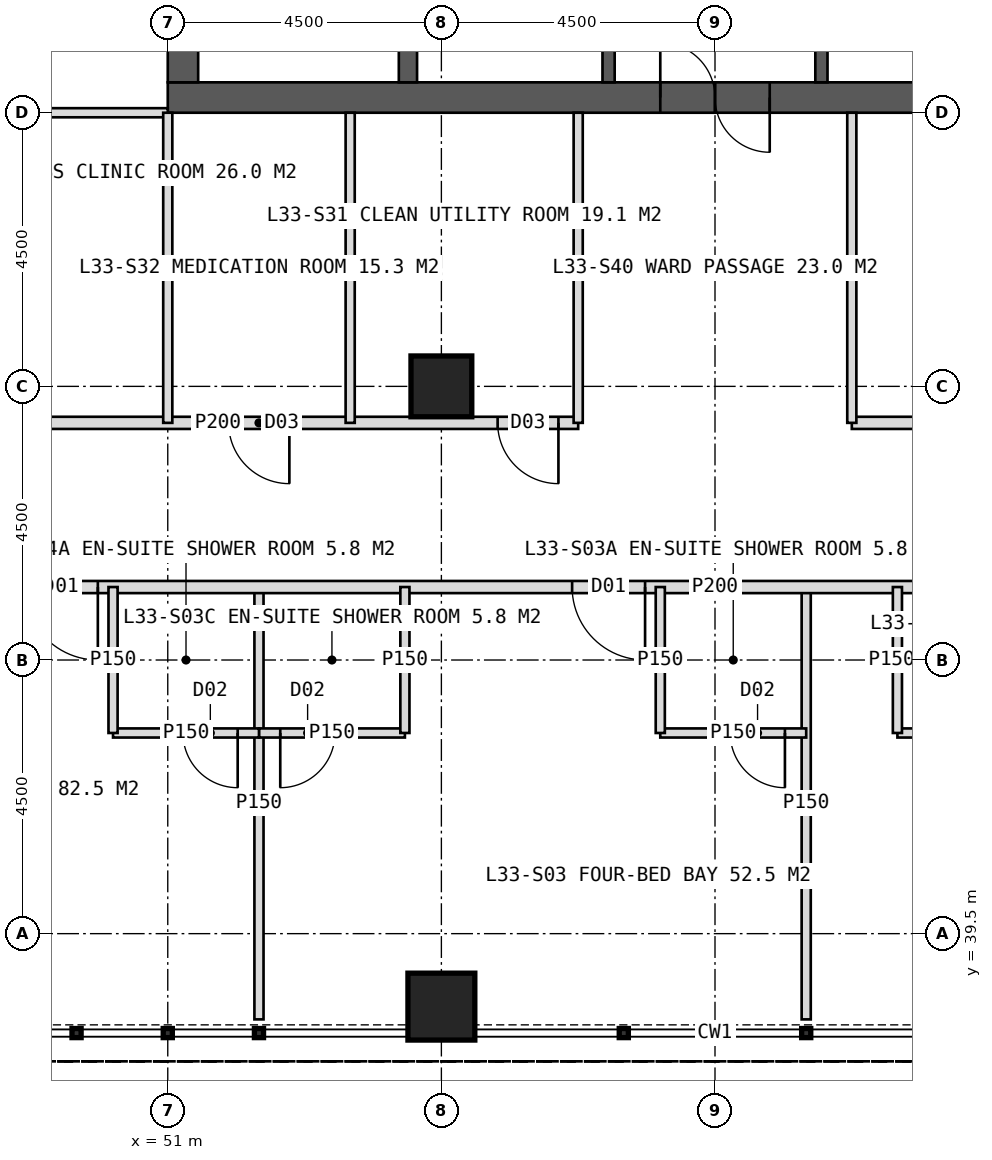
"""IFC4 building model, lengths in metres.
Left out: names, types, materials, properties, quantities, classifications, styles, units other than length and angle.
Written with IfcOpenShell. Run it as: python <this file> out.ifc"""

import sys

from ifc_helpers import new_model, si_unit, direction, frame, frame_2d, origin, origin_2d, place, context, subcontext, project, spatial, rectangle, hollow_rectangle, extrude, element, fill, save


model = new_model("IFC4")
c1 = context("Model", 3, precision=1e-05, world=origin(), true_north=direction((0.0, 1.0)))
c2 = subcontext(c1, "Body", "Model", "MODEL_VIEW")
j1 = project(units=[si_unit("LENGTHUNIT", "METRE"), si_unit("PLANEANGLEUNIT", "RADIAN")], contexts=[c1])
p1 = place(None, origin())
s1 = spatial("IfcSite", under=j1, at=p1, CompositionType="ELEMENT")
p2 = place(p1, origin())
s2 = spatial("IfcBuilding", under=s1, at=p2, CompositionType="ELEMENT")
p3 = place(p2, frame((0.0, 0.0, 140.0)))
s3 = spatial("IfcBuildingStorey", under=s2, at=p3, CompositionType="ELEMENT", Elevation=140.0)
p4 = place(p3, frame((51.0, 53.25, 0.0), z_axis=(0.0, 0.0, 1.0), x_axis=(1.0, 0.0, 0.0)))
e1 = element("IfcWall", 1, at=p4, inside=s3, PredefinedType="SHEAR", context=c2, shape_type="SweptSolid", body=[
    extrude(rectangle(XDim=18.0, YDim=0.5, at=frame_2d((9.0, 0.0))), origin(), (0.0, 0.0, 1.0), 4.0),
])
p5 = place(p4, frame((8.1, 0.0, 0.0)))
e2 = element("IfcOpeningElement", 2, at=p5, cuts=e1, PredefinedType="OPENING", context=c2, shape_type="SweptSolid", body=[
    extrude(rectangle(XDim=1.8, YDim=2.2, at=frame_2d((0.9, 1.1))), frame((0.0, 0.26, 0.0), z_axis=(0.0, -1.0, 0.0), x_axis=(1.0, 0.0, 0.0)), (0.0, 0.0, 1.0), 0.52),
])
p6 = place(p3, frame((51.25, 53.5, 0.0), z_axis=(0.0, 0.0, 1.0), x_axis=(0.0, 1.0, 0.0)))
e3 = element("IfcWall", 3, at=p6, inside=s3, PredefinedType="SHEAR", context=c2, shape_type="SweptSolid", body=[
    extrude(rectangle(XDim=17.0, YDim=0.5, at=frame_2d((8.5, 0.0))), origin(), (0.0, 0.0, 1.0), 4.0),
])
p7 = place(p6, frame((6.0, 0.0, 0.0)))
e4 = element("IfcOpeningElement", 4, at=p7, cuts=e3, PredefinedType="OPENING", context=c2, shape_type="SweptSolid", body=[
    extrude(rectangle(XDim=1.5, YDim=2.2, at=frame_2d((0.75, 1.1))), frame((0.0, 0.26, 0.0), z_axis=(0.0, -1.0, 0.0), x_axis=(1.0, 0.0, 0.0)), (0.0, 0.0, 1.0), 0.52),
])
p8 = place(p3, frame((54.95, 53.5, 0.0), z_axis=(0.0, 0.0, 1.0), x_axis=(0.0, 1.0, 0.0)))
e5 = element("IfcWall", 5, at=p8, inside=s3, PredefinedType="SHEAR", context=c2, shape_type="SweptSolid", body=[
    extrude(rectangle(XDim=17.0, YDim=0.3, at=frame_2d((8.5, 0.0))), origin(), (0.0, 0.0, 1.0), 4.0),
])
p9 = place(p3, frame((58.25, 53.5, 0.0), z_axis=(0.0, 0.0, 1.0), x_axis=(0.0, 1.0, 0.0)))
e6 = element("IfcWall", 6, at=p9, inside=s3, PredefinedType="SHEAR", context=c2, shape_type="SweptSolid", body=[
    extrude(rectangle(XDim=17.0, YDim=0.2, at=frame_2d((8.5, 0.0))), origin(), (0.0, 0.0, 1.0), 4.0),
])
p10 = place(p9, frame((1.375, 0.0, 0.0)))
e7 = element("IfcOpeningElement", 7, at=p10, cuts=e6, PredefinedType="OPENING", context=c2, shape_type="SweptSolid", body=[
    extrude(rectangle(XDim=1.4, YDim=2.2, at=frame_2d((0.7, 1.1))), frame((0.0, 0.11, 0.0), z_axis=(0.0, -1.0, 0.0), x_axis=(1.0, 0.0, 0.0)), (0.0, 0.0, 1.0), 0.22),
])
p11 = place(p9, frame((5.675, 0.0, 0.0)))
e8 = element("IfcOpeningElement", 8, at=p11, cuts=e6, PredefinedType="OPENING", context=c2, shape_type="SweptSolid", body=[
    extrude(rectangle(XDim=1.4, YDim=2.2, at=frame_2d((0.7, 1.1))), frame((0.0, 0.11, 0.0), z_axis=(0.0, -1.0, 0.0), x_axis=(1.0, 0.0, 0.0)), (0.0, 0.0, 1.0), 0.22),
])
p12 = place(p3, frame((61.75, 53.5, 0.0), z_axis=(0.0, 0.0, 1.0), x_axis=(0.0, 1.0, 0.0)))
e9 = element("IfcWall", 9, at=p12, inside=s3, PredefinedType="SHEAR", context=c2, shape_type="SweptSolid", body=[
    extrude(rectangle(XDim=17.0, YDim=0.2, at=frame_2d((8.5, 0.0))), origin(), (0.0, 0.0, 1.0), 4.0),
])
p13 = place(p12, frame((1.375, 0.0, 0.0)))
e10 = element("IfcOpeningElement", 10, at=p13, cuts=e9, PredefinedType="OPENING", context=c2, shape_type="SweptSolid", body=[
    extrude(rectangle(XDim=1.4, YDim=2.2, at=frame_2d((0.7, 1.1))), frame((0.0, 0.11, 0.0), z_axis=(0.0, -1.0, 0.0), x_axis=(1.0, 0.0, 0.0)), (0.0, 0.0, 1.0), 0.22),
])
p14 = place(p12, frame((5.675, 0.0, 0.0)))
e11 = element("IfcOpeningElement", 11, at=p14, cuts=e9, PredefinedType="OPENING", context=c2, shape_type="SweptSolid", body=[
    extrude(rectangle(XDim=1.4, YDim=2.2, at=frame_2d((0.7, 1.1))), frame((0.0, 0.11, 0.0), z_axis=(0.0, -1.0, 0.0), x_axis=(1.0, 0.0, 0.0)), (0.0, 0.0, 1.0), 0.22),
])
p15 = place(p3, frame((55.5, 48.5, 0.0), z_axis=(0.0, 0.0, 1.0), x_axis=(1.0, 0.0, 0.0)))
e12 = element("IfcColumn", 12, at=p15, inside=s3, PredefinedType="COLUMN", context=c2, shape_type="SweptSolid", body=[
    extrude(hollow_rectangle(XDim=1.0, YDim=1.0, WallThickness=0.1, at=origin_2d()), origin(), (0.0, 0.0, 1.0), 4.0),
])
p16 = place(p3, frame((55.5, 38.3, 0.0), z_axis=(0.0, 0.0, 1.0), x_axis=(1.0, 0.0, 0.0)))
e13 = element("IfcColumn", 13, at=p16, inside=s3, PredefinedType="COLUMN", context=c2, shape_type="SweptSolid", body=[
    extrude(hollow_rectangle(XDim=1.1, YDim=1.1, WallThickness=0.1, at=origin_2d()), origin(), (0.0, 0.0, 1.0), 4.0),
])
p17 = place(p3, frame((51.0, 53.0, 0.0), z_axis=(0.0, 0.0, 1.0), x_axis=(-1.0, 0.0, 0.0)))
e14 = element("IfcWall", 14, at=p17, inside=s3, PredefinedType="PARTITIONING", context=c2, shape_type="SweptSolid", body=[
    extrude(rectangle(XDim=5.1, YDim=0.15, at=frame_2d((2.55, 0.0))), origin(), (0.0, 0.0, 1.0), 3.75),
])
for number, where, z_axis, x_axis in (
    (15, (61.5, 45.2, 0.0), (0.0, 0.0, 1.0), (0.0, -1.0, 0.0)),
    (16, (52.5, 45.2, 0.0), (0.0, 0.0, 1.0), (0.0, -1.0, 0.0)),
):
    element("IfcWall", number, at=place(p3, frame(where, z_axis=z_axis, x_axis=x_axis)), inside=s3, PredefinedType="PARTITIONING", context=c2, shape_type="SweptSolid", body=[
        extrude(rectangle(XDim=7.11, YDim=0.15, at=frame_2d((3.555, 0.0))), origin(), (0.0, 0.0, 1.0), 3.75),
    ])
p18 = place(p3, frame((76.8, 45.2, 0.0), z_axis=(0.0, 0.0, 1.0), x_axis=(-1.0, 0.0, 0.0)))
e17 = element("IfcWall", 17, at=p18, inside=s3, PredefinedType="PARTITIONING", context=c2, shape_type="SweptSolid", body=[
    extrude(rectangle(XDim=33.6, YDim=0.2, at=frame_2d((16.8, 0.0))), origin(), (0.0, 0.0, 1.0), 3.75),
])
p19 = place(p18, frame((2.65, 0.0, 0.0)))
e18 = element("IfcOpeningElement", 18, at=p19, cuts=e17, PredefinedType="OPENING", context=c2, shape_type="SweptSolid", body=[
    extrude(rectangle(XDim=1.2, YDim=2.2, at=frame_2d((0.6, 1.1))), frame((0.0, 0.11, 0.0), z_axis=(0.0, -1.0, 0.0), x_axis=(1.0, 0.0, 0.0)), (0.0, 0.0, 1.0), 0.22),
])
p20 = place(p18, frame((11.05, 0.0, 0.0)))
e19 = element("IfcOpeningElement", 19, at=p20, cuts=e17, PredefinedType="OPENING", context=c2, shape_type="SweptSolid", body=[
    extrude(rectangle(XDim=1.2, YDim=2.2, at=frame_2d((0.6, 1.1))), frame((0.0, 0.11, 0.0), z_axis=(0.0, -1.0, 0.0), x_axis=(1.0, 0.0, 0.0)), (0.0, 0.0, 1.0), 0.22),
])
p21 = place(p18, frame((17.95, 0.0, 0.0)))
e20 = element("IfcOpeningElement", 20, at=p21, cuts=e17, PredefinedType="OPENING", context=c2, shape_type="SweptSolid", body=[
    extrude(rectangle(XDim=1.2, YDim=2.2, at=frame_2d((0.6, 1.1))), frame((0.0, 0.11, 0.0), z_axis=(0.0, -1.0, 0.0), x_axis=(1.0, 0.0, 0.0)), (0.0, 0.0, 1.0), 0.22),
])
p22 = place(p18, frame((26.95, 0.0, 0.0)))
e21 = element("IfcOpeningElement", 21, at=p22, cuts=e17, PredefinedType="OPENING", context=c2, shape_type="SweptSolid", body=[
    extrude(rectangle(XDim=1.2, YDim=2.2, at=frame_2d((0.6, 1.1))), frame((0.0, 0.11, 0.0), z_axis=(0.0, -1.0, 0.0), x_axis=(1.0, 0.0, 0.0)), (0.0, 0.0, 1.0), 0.22),
])
p23 = place(p3, frame((66.0, 42.8, 0.0), z_axis=(0.0, 0.0, 1.0), x_axis=(-1.0, 0.0, 0.0)))
e22 = element("IfcWall", 22, at=p23, inside=s3, PredefinedType="PARTITIONING", context=c2, shape_type="SweptSolid", body=[
    extrude(rectangle(XDim=3.0, YDim=0.15, at=frame_2d((1.5, 0.0))), origin(), (0.0, 0.0, 1.0), 3.75),
])
p24 = place(p23, frame((0.25, 0.0, 0.0)))
e23 = element("IfcOpeningElement", 23, at=p24, cuts=e22, PredefinedType="OPENING", context=c2, shape_type="SweptSolid", body=[
    extrude(rectangle(XDim=1.2, YDim=2.2, at=frame_2d((0.6, 1.1))), frame((0.0, 0.085, 0.0), z_axis=(0.0, -1.0, 0.0), x_axis=(1.0, 0.0, 0.0)), (0.0, 0.0, 1.0), 0.17),
])
p25 = place(p3, frame((63.0, 45.2, 0.0), z_axis=(0.0, 0.0, 1.0), x_axis=(0.0, -1.0, 0.0)))
e24 = element("IfcWall", 24, at=p25, inside=s3, PredefinedType="PARTITIONING", context=c2, shape_type="SweptSolid", body=[
    extrude(rectangle(XDim=2.4, YDim=0.15, at=frame_2d((1.2, 0.0))), origin(), (0.0, 0.0, 1.0), 3.75),
])
p26 = place(p3, frame((61.5, 42.8, 0.0), z_axis=(0.0, 0.0, 1.0), x_axis=(-1.0, 0.0, 0.0)))
e25 = element("IfcWall", 25, at=p26, inside=s3, PredefinedType="PARTITIONING", context=c2, shape_type="SweptSolid", body=[
    extrude(rectangle(XDim=2.4, YDim=0.15, at=frame_2d((1.2, 0.0))), origin(), (0.0, 0.0, 1.0), 3.75),
])
p27 = place(p26, frame((0.35, 0.0, 0.0)))
e26 = element("IfcOpeningElement", 26, at=p27, cuts=e25, PredefinedType="OPENING", context=c2, shape_type="SweptSolid", body=[
    extrude(rectangle(XDim=0.9, YDim=2.1, at=frame_2d((0.45, 1.05))), frame((0.0, 0.085, 0.0), z_axis=(0.0, -1.0, 0.0), x_axis=(1.0, 0.0, 0.0)), (0.0, 0.0, 1.0), 0.17),
])
p28 = place(p3, frame((59.1, 45.2, 0.0), z_axis=(0.0, 0.0, 1.0), x_axis=(0.0, -1.0, 0.0)))
e27 = element("IfcWall", 27, at=p28, inside=s3, PredefinedType="PARTITIONING", context=c2, shape_type="SweptSolid", body=[
    extrude(rectangle(XDim=2.4, YDim=0.15, at=frame_2d((1.2, 0.0))), origin(), (0.0, 0.0, 1.0), 3.75),
])
p29 = place(p3, frame((54.9, 42.8, 0.0), z_axis=(0.0, 0.0, 1.0), x_axis=(-1.0, 0.0, 0.0)))
e28 = element("IfcWall", 28, at=p29, inside=s3, PredefinedType="PARTITIONING", context=c2, shape_type="SweptSolid", body=[
    extrude(rectangle(XDim=2.4, YDim=0.15, at=frame_2d((1.2, 0.0))), origin(), (0.0, 0.0, 1.0), 3.75),
])
p30 = place(p29, frame((1.15, 0.0, 0.0)))
e29 = element("IfcOpeningElement", 29, at=p30, cuts=e28, PredefinedType="OPENING", context=c2, shape_type="SweptSolid", body=[
    extrude(rectangle(XDim=0.9, YDim=2.1, at=frame_2d((0.45, 1.05))), frame((0.0, 0.085, 0.0), z_axis=(0.0, -1.0, 0.0), x_axis=(1.0, 0.0, 0.0)), (0.0, 0.0, 1.0), 0.17),
])
p31 = place(p3, frame((54.9, 45.2, 0.0), z_axis=(0.0, 0.0, 1.0), x_axis=(0.0, -1.0, 0.0)))
e30 = element("IfcWall", 30, at=p31, inside=s3, PredefinedType="PARTITIONING", context=c2, shape_type="SweptSolid", body=[
    extrude(rectangle(XDim=2.4, YDim=0.15, at=frame_2d((1.2, 0.0))), origin(), (0.0, 0.0, 1.0), 3.75),
])
p32 = place(p3, frame((52.5, 42.8, 0.0), z_axis=(0.0, 0.0, 1.0), x_axis=(-1.0, 0.0, 0.0)))
e31 = element("IfcWall", 31, at=p32, inside=s3, PredefinedType="PARTITIONING", context=c2, shape_type="SweptSolid", body=[
    extrude(rectangle(XDim=2.4, YDim=0.15, at=frame_2d((1.2, 0.0))), origin(), (0.0, 0.0, 1.0), 3.75),
])
p33 = place(p32, frame((0.35, 0.0, 0.0)))
e32 = element("IfcOpeningElement", 32, at=p33, cuts=e31, PredefinedType="OPENING", context=c2, shape_type="SweptSolid", body=[
    extrude(rectangle(XDim=0.9, YDim=2.1, at=frame_2d((0.45, 1.05))), frame((0.0, 0.085, 0.0), z_axis=(0.0, -1.0, 0.0), x_axis=(1.0, 0.0, 0.0)), (0.0, 0.0, 1.0), 0.17),
])
p34 = place(p3, frame((50.1, 45.2, 0.0), z_axis=(0.0, 0.0, 1.0), x_axis=(0.0, -1.0, 0.0)))
e33 = element("IfcWall", 33, at=p34, inside=s3, PredefinedType="PARTITIONING", context=c2, shape_type="SweptSolid", body=[
    extrude(rectangle(XDim=2.4, YDim=0.15, at=frame_2d((1.2, 0.0))), origin(), (0.0, 0.0, 1.0), 3.75),
])
p35 = place(p3, frame((74.1, 47.9, 0.0), z_axis=(0.0, 0.0, 1.0), x_axis=(-1.0, 0.0, 0.0)))
e34 = element("IfcWall", 34, at=p35, inside=s3, PredefinedType="PARTITIONING", context=c2, shape_type="SweptSolid", body=[
    extrude(rectangle(XDim=11.85, YDim=0.2, at=frame_2d((5.925, 0.0))), origin(), (0.0, 0.0, 1.0), 3.75),
])
p36 = place(p35, frame((6.55, 0.0, 0.0)))
e35 = element("IfcOpeningElement", 35, at=p36, cuts=e34, PredefinedType="OPENING", context=c2, shape_type="SweptSolid", body=[
    extrude(rectangle(XDim=1.0, YDim=2.1, at=frame_2d((0.5, 1.05))), frame((0.0, 0.11, 0.0), z_axis=(0.0, -1.0, 0.0), x_axis=(1.0, 0.0, 0.0)), (0.0, 0.0, 1.0), 0.22),
])
p37 = place(p3, frame((57.75, 47.9, 0.0), z_axis=(0.0, 0.0, 1.0), x_axis=(-1.0, 0.0, 0.0)))
e36 = element("IfcWall", 36, at=p37, inside=s3, PredefinedType="PARTITIONING", context=c2, shape_type="SweptSolid", body=[
    extrude(rectangle(XDim=11.85, YDim=0.2, at=frame_2d((5.925, 0.0))), origin(), (0.0, 0.0, 1.0), 3.75),
])
p38 = place(p37, frame((0.325, 0.0, 0.0)))
e37 = element("IfcOpeningElement", 37, at=p38, cuts=e36, PredefinedType="OPENING", context=c2, shape_type="SweptSolid", body=[
    extrude(rectangle(XDim=1.0, YDim=2.1, at=frame_2d((0.5, 1.05))), frame((0.0, 0.11, 0.0), z_axis=(0.0, -1.0, 0.0), x_axis=(1.0, 0.0, 0.0)), (0.0, 0.0, 1.0), 0.22),
])
p39 = place(p37, frame((4.75, 0.0, 0.0)))
e38 = element("IfcOpeningElement", 38, at=p39, cuts=e36, PredefinedType="OPENING", context=c2, shape_type="SweptSolid", body=[
    extrude(rectangle(XDim=1.0, YDim=2.1, at=frame_2d((0.5, 1.05))), frame((0.0, 0.11, 0.0), z_axis=(0.0, -1.0, 0.0), x_axis=(1.0, 0.0, 0.0)), (0.0, 0.0, 1.0), 0.22),
])
p40 = place(p37, frame((8.8, 0.0, 0.0)))
e39 = element("IfcOpeningElement", 39, at=p40, cuts=e36, PredefinedType="OPENING", context=c2, shape_type="SweptSolid", body=[
    extrude(rectangle(XDim=1.0, YDim=2.1, at=frame_2d((0.5, 1.05))), frame((0.0, 0.11, 0.0), z_axis=(0.0, -1.0, 0.0), x_axis=(1.0, 0.0, 0.0)), (0.0, 0.0, 1.0), 0.22),
])
for number, where, z_axis, x_axis in (
    (40, (62.25, 53.0, 0.0), (0.0, 0.0, 1.0), (0.0, -1.0, 0.0)),
    (41, (57.75, 53.0, 0.0), (0.0, 0.0, 1.0), (0.0, -1.0, 0.0)),
    (42, (54.0, 53.0, 0.0), (0.0, 0.0, 1.0), (0.0, -1.0, 0.0)),
    (43, (51.0, 53.0, 0.0), (0.0, 0.0, 1.0), (0.0, -1.0, 0.0)),
):
    element("IfcWall", number, at=place(p3, frame(where, z_axis=z_axis, x_axis=x_axis)), inside=s3, PredefinedType="PARTITIONING", context=c2, shape_type="SweptSolid", body=[
        extrude(rectangle(XDim=5.1, YDim=0.15, at=frame_2d((2.55, 0.0))), origin(), (0.0, 0.0, 1.0), 3.75),
    ])
p41 = place(p21, origin())
e44 = element("IfcDoor", 44, at=p41, inside=s3, OperationType="SINGLE_SWING_LEFT", PredefinedType="DOOR", context=c2, shape_type="SweptSolid", body=[
    extrude(rectangle(XDim=1.2, YDim=2.2, at=frame_2d((0.6, 1.1))), frame((0.0, 0.025, 0.0), z_axis=(0.0, -1.0, 0.0), x_axis=(1.0, 0.0, 0.0)), (0.0, 0.0, 1.0), 0.05),
])
fill(e20, e44)
p42 = place(p27, origin())
e45 = element("IfcDoor", 45, at=p42, inside=s3, OperationType="SINGLE_SWING_LEFT", PredefinedType="DOOR", context=c2, shape_type="SweptSolid", body=[
    extrude(rectangle(XDim=0.9, YDim=2.1, at=frame_2d((0.45, 1.05))), frame((0.0, 0.025, 0.0), z_axis=(0.0, -1.0, 0.0), x_axis=(1.0, 0.0, 0.0)), (0.0, 0.0, 1.0), 0.05),
])
fill(e26, e45)
p43 = place(p30, origin())
e46 = element("IfcDoor", 46, at=p43, inside=s3, OperationType="SINGLE_SWING_RIGHT", PredefinedType="DOOR", context=c2, shape_type="SweptSolid", body=[
    extrude(rectangle(XDim=0.9, YDim=2.1, at=frame_2d((0.45, 1.05))), frame((0.0, 0.025, 0.0), z_axis=(0.0, -1.0, 0.0), x_axis=(1.0, 0.0, 0.0)), (0.0, 0.0, 1.0), 0.05),
])
fill(e29, e46)
p44 = place(p22, origin())
e47 = element("IfcDoor", 47, at=p44, inside=s3, OperationType="SINGLE_SWING_LEFT", PredefinedType="DOOR", context=c2, shape_type="SweptSolid", body=[
    extrude(rectangle(XDim=1.2, YDim=2.2, at=frame_2d((0.6, 1.1))), frame((0.0, 0.025, 0.0), z_axis=(0.0, -1.0, 0.0), x_axis=(1.0, 0.0, 0.0)), (0.0, 0.0, 1.0), 0.05),
])
fill(e21, e47)
p45 = place(p33, origin())
e48 = element("IfcDoor", 48, at=p45, inside=s3, OperationType="SINGLE_SWING_LEFT", PredefinedType="DOOR", context=c2, shape_type="SweptSolid", body=[
    extrude(rectangle(XDim=0.9, YDim=2.1, at=frame_2d((0.45, 1.05))), frame((0.0, 0.025, 0.0), z_axis=(0.0, -1.0, 0.0), x_axis=(1.0, 0.0, 0.0)), (0.0, 0.0, 1.0), 0.05),
])
fill(e32, e48)
p46 = place(p38, origin())
e49 = element("IfcDoor", 49, at=p46, inside=s3, OperationType="SINGLE_SWING_LEFT", PredefinedType="DOOR", context=c2, shape_type="SweptSolid", body=[
    extrude(rectangle(XDim=1.0, YDim=2.1, at=frame_2d((0.5, 1.05))), frame((0.0, 0.025, 0.0), z_axis=(0.0, -1.0, 0.0), x_axis=(1.0, 0.0, 0.0)), (0.0, 0.0, 1.0), 0.05),
])
fill(e37, e49)
p47 = place(p39, origin())
e50 = element("IfcDoor", 50, at=p47, inside=s3, OperationType="SINGLE_SWING_LEFT", PredefinedType="DOOR", context=c2, shape_type="SweptSolid", body=[
    extrude(rectangle(XDim=1.0, YDim=2.1, at=frame_2d((0.5, 1.05))), frame((0.0, 0.025, 0.0), z_axis=(0.0, -1.0, 0.0), x_axis=(1.0, 0.0, 0.0)), (0.0, 0.0, 1.0), 0.05),
])
fill(e38, e50)
p48 = place(p5, origin())
e51 = element("IfcDoor", 51, at=p48, inside=s3, OperationType="DOUBLE_DOOR_SINGLE_SWING", PredefinedType="DOOR", context=c2, shape_type="SweptSolid", body=[
    extrude(rectangle(XDim=1.8, YDim=2.2, at=frame_2d((0.9, 1.1))), frame((0.0, 0.025, 0.0), z_axis=(0.0, -1.0, 0.0), x_axis=(1.0, 0.0, 0.0)), (0.0, 0.0, 1.0), 0.05),
])
fill(e2, e51)
save(model, sys.argv[1])
